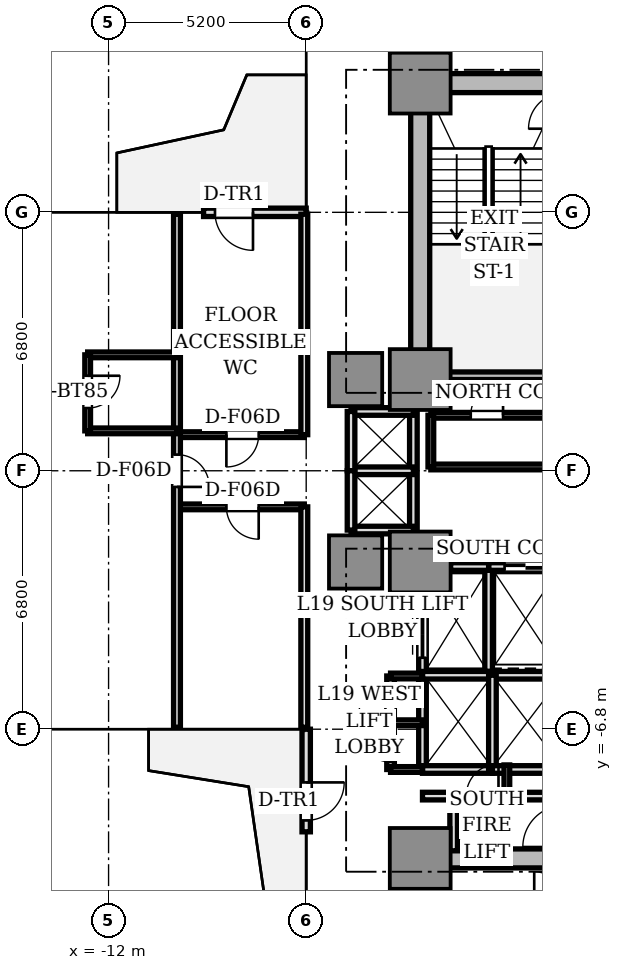
"""IFC4 building model, lengths in metres.
Left out: names, types, materials, properties, quantities, classifications, styles, units other than length and angle.
Written with IfcOpenShell. Run it as: python <this file> out.ifc"""

import sys

from ifc_helpers import new_model, si_unit, direction, frame, frame_2d, origin, origin_2d, place, context, subcontext, project, spatial, rectangle, extrude, source, transform, mapped, element, fill, save


model = new_model("IFC4")
c1 = context("Model", 3, precision=1e-05, world=origin(), true_north=direction((0.0, 1.0)))
c2 = subcontext(c1, "Body", "Model", "MODEL_VIEW")
j1 = project(units=[si_unit("LENGTHUNIT", "METRE"), si_unit("PLANEANGLEUNIT", "RADIAN")], contexts=[c1])
p1 = place(None, origin())
s1 = spatial("IfcSite", under=j1, at=p1, CompositionType="ELEMENT")
p2 = place(p1, origin())
s2 = spatial("IfcBuilding", under=s1, at=p2, CompositionType="ELEMENT")
p3 = place(p2, frame((0.0, 0.0, 71.15)))
s3 = spatial("IfcBuildingStorey", under=s2, at=p3, CompositionType="ELEMENT", Elevation=71.15)
p4 = place(p3, frame((-3.55, 10.2, 0.0), z_axis=(0.0, 0.0, 1.0), x_axis=(1.0, 0.0, 0.0)))
e1 = element("IfcWall", 1, at=p4, inside=s3, PredefinedType="SHEAR", context=c2, shape_type="SweptSolid", body=[
    extrude(rectangle(XDim=7.1, YDim=0.5, at=frame_2d((3.55, 0.0))), origin(), (0.0, 0.0, 1.0), 3.03),
])
p5 = place(p3, frame((-3.8, 2.85, 0.0), z_axis=(0.0, 0.0, 1.0), x_axis=(0.0, 1.0, 0.0)))
e2 = element("IfcWall", 2, at=p5, inside=s3, PredefinedType="SHEAR", context=c2, shape_type="SweptSolid", body=[
    extrude(rectangle(XDim=6.9, YDim=0.5, at=frame_2d((3.45, 0.0))), origin(), (0.0, 0.0, 1.0), 3.03),
])
p6 = place(p3, frame((-3.55, -10.2, 0.0), z_axis=(0.0, 0.0, 1.0), x_axis=(1.0, 0.0, 0.0)))
e3 = element("IfcWall", 3, at=p6, inside=s3, PredefinedType="SHEAR", context=c2, shape_type="SweptSolid", body=[
    extrude(rectangle(XDim=7.1, YDim=0.5, at=frame_2d((3.55, 0.0))), origin(), (0.0, 0.0, 1.0), 3.03),
])
m1 = source(origin(), c2, "Body", "SweptSolid", [
    extrude(rectangle(XDim=1.6, YDim=1.6, at=origin_2d()), origin(), (0.0, 0.0, 1.0), 3.03),
])
for number, where, z_axis, x_axis in (
    (4, (-3.8, 2.4, 0.0), (0.0, 0.0, 1.0), (1.0, 0.0, 0.0)),
    (5, (-3.8, 10.2, 0.0), (0.0, 0.0, 1.0), (1.0, 0.0, 0.0)),
    (6, (-3.8, -2.4, 0.0), (0.0, 0.0, 1.0), (1.0, 0.0, 0.0)),
    (7, (-3.8, -10.2, 0.0), (0.0, 0.0, 1.0), (1.0, 0.0, 0.0)),
):
    element("IfcColumn", number, at=place(p3, frame(where, z_axis=z_axis, x_axis=x_axis)), inside=s3, PredefinedType="COLUMN", context=c2, shape_type="MappedRepresentation", body=[
        mapped(m1, transform((0.0, 0.0, 0.0), scale=1.0)),
    ])
m2 = source(origin(), c2, "Body", "SweptSolid", [
    extrude(rectangle(XDim=1.4, YDim=1.4, at=origin_2d()), origin(), (0.0, 0.0, 1.0), 3.03),
])
for number, where, z_axis, x_axis in (
    (8, (-5.5, 2.4, 0.0), (0.0, 0.0, 1.0), (1.0, 0.0, 0.0)),
    (9, (-5.5, -2.4, 0.0), (0.0, 0.0, 1.0), (1.0, 0.0, 0.0)),
):
    element("IfcColumn", number, at=place(p3, frame(where, z_axis=z_axis, x_axis=x_axis)), inside=s3, PredefinedType="COLUMN", context=c2, shape_type="MappedRepresentation", body=[
        mapped(m2, transform((0.0, 0.0, 0.0), scale=1.0)),
    ])
p7 = place(p3, frame((-6.8, 6.8, 0.0), z_axis=(0.0, 0.0, 1.0), x_axis=(-1.0, 0.0, 0.0)))
e10 = element("IfcWall", 10, at=p7, inside=s3, PredefinedType="STANDARD", context=c2, shape_type="SweptSolid", body=[
    extrude(rectangle(XDim=2.7, YDim=0.22, at=frame_2d((1.35, 0.0))), origin(), (0.0, 0.0, 1.0), 3.03),
])
p8 = place(p7, frame((1.4, 0.0, 0.0)))
e11 = element("IfcOpeningElement", 11, at=p8, cuts=e10, PredefinedType="OPENING", context=c2, shape_type="SweptSolid", body=[
    extrude(rectangle(XDim=1.0, YDim=2.2, at=frame_2d((0.5, 1.1))), frame((0.0, 0.12, 0.0), z_axis=(0.0, -1.0, 0.0), x_axis=(1.0, 0.0, 0.0)), (0.0, 0.0, 1.0), 0.24),
])
p9 = place(p3, frame((-6.8, -6.8, 0.0), z_axis=(0.0, 0.0, 1.0), x_axis=(0.0, -1.0, 0.0)))
e12 = element("IfcWall", 12, at=p9, inside=s3, PredefinedType="STANDARD", context=c2, shape_type="SweptSolid", body=[
    extrude(rectangle(XDim=2.7, YDim=0.22, at=frame_2d((1.35, 0.0))), origin(), (0.0, 0.0, 1.0), 3.03),
])
p10 = place(p9, frame((1.4, 0.0, 0.0)))
e13 = element("IfcOpeningElement", 13, at=p10, cuts=e12, PredefinedType="OPENING", context=c2, shape_type="SweptSolid", body=[
    extrude(rectangle(XDim=1.0, YDim=2.2, at=frame_2d((0.5, 1.1))), frame((0.0, 0.12, 0.0), z_axis=(0.0, -1.0, 0.0), x_axis=(1.0, 0.0, 0.0)), (0.0, 0.0, 1.0), 0.24),
])
p11 = place(p3, frame((-3.72, 2.5, 0.0), z_axis=(0.0, 0.0, 1.0), x_axis=(1.0, 0.0, 0.0)))
e14 = element("IfcWall", 14, at=p11, inside=s3, PredefinedType="SOLIDWALL", context=c2, shape_type="SweptSolid", body=[
    extrude(rectangle(XDim=3.72, YDim=0.2, at=frame_2d((1.86, 0.0))), origin(), (0.0, 0.0, 1.0), 3.03),
])
p12 = place(p3, frame((-2.0, -5.28, 0.0), z_axis=(0.0, 0.0, 1.0), x_axis=(0.0, 1.0, 0.0)))
e15 = element("IfcWall", 15, at=p12, inside=s3, PredefinedType="SOLIDWALL", context=c2, shape_type="SweptSolid", body=[
    extrude(rectangle(XDim=2.78, YDim=0.2, at=frame_2d((1.39, 0.0))), origin(), (0.0, 0.0, 1.0), 2.58),
])
p13 = place(p3, frame((-2.0, -2.52, 0.0), z_axis=(0.0, 0.0, 1.0), x_axis=(1.0, 0.0, 0.0)))
e16 = element("IfcWall", 16, at=p13, inside=s3, PredefinedType="SOLIDWALL", context=c2, shape_type="SweptSolid", body=[
    extrude(rectangle(XDim=1.95, YDim=0.2, at=frame_2d((0.975, 0.0))), origin(), (0.0, 0.0, 1.0), 2.58),
])
p14 = place(p13, frame((0.42, 0.0, 0.0)))
e17 = element("IfcOpeningElement", 17, at=p14, cuts=e16, PredefinedType="OPENING", context=c2, shape_type="SweptSolid", body=[
    extrude(rectangle(XDim=1.1, YDim=2.2, at=frame_2d((0.55, 1.1))), frame((0.0, 0.11, 0.0), z_axis=(0.0, -1.0, 0.0), x_axis=(1.0, 0.0, 0.0)), (0.0, 0.0, 1.0), 0.22),
])
p15 = place(p3, frame((-3.0, -2.52, 0.0), z_axis=(0.0, 0.0, 1.0), x_axis=(1.0, 0.0, 0.0)))
e18 = element("IfcWall", 18, at=p15, inside=s3, PredefinedType="SOLIDWALL", context=c2, shape_type="SweptSolid", body=[
    extrude(rectangle(XDim=1.0, YDim=0.2, at=frame_2d((0.5, 0.0))), origin(), (0.0, 0.0, 1.0), 2.58),
])
p16 = place(p3, frame((-3.74, -5.36, 0.0), z_axis=(0.0, 0.0, 1.0), x_axis=(0.0, 1.0, 0.0)))
e19 = element("IfcWall", 19, at=p16, inside=s3, PredefinedType="SOLIDWALL", context=c2, shape_type="SweptSolid", body=[
    extrude(rectangle(XDim=2.08, YDim=0.2, at=frame_2d((1.04, 0.0))), origin(), (0.0, 0.0, 1.0), 2.58),
])
p17 = place(p16, frame((0.44, 0.0, 0.0)))
e20 = element("IfcOpeningElement", 20, at=p17, cuts=e19, PredefinedType="OPENING", context=c2, shape_type="SweptSolid", body=[
    extrude(rectangle(XDim=1.2, YDim=2.2, at=frame_2d((0.6, 1.1))), frame((0.0, 0.11, 0.0), z_axis=(0.0, -1.0, 0.0), x_axis=(1.0, 0.0, 0.0)), (0.0, 0.0, 1.0), 0.22),
])
p18 = place(p3, frame((-3.74, -7.86, 0.0), z_axis=(0.0, 0.0, 1.0), x_axis=(0.0, 1.0, 0.0)))
e21 = element("IfcWall", 21, at=p18, inside=s3, PredefinedType="SOLIDWALL", context=c2, shape_type="SweptSolid", body=[
    extrude(rectangle(XDim=2.48, YDim=0.2, at=frame_2d((1.24, 0.0))), origin(), (0.0, 0.0, 1.0), 2.58),
])
p19 = place(p3, frame((-3.74, -7.86, 0.0), z_axis=(0.0, 0.0, 1.0), x_axis=(1.0, 0.0, 0.0)))
e22 = element("IfcWall", 22, at=p19, inside=s3, PredefinedType="SOLIDWALL", context=c2, shape_type="SweptSolid", body=[
    extrude(rectangle(XDim=1.84, YDim=0.2, at=frame_2d((0.92, 0.0))), origin(), (0.0, 0.0, 1.0), 2.58),
])
p20 = place(p3, frame((-3.74, -5.38, 0.0), z_axis=(0.0, 0.0, 1.0), x_axis=(1.0, 0.0, 0.0)))
e23 = element("IfcWall", 23, at=p20, inside=s3, PredefinedType="SOLIDWALL", context=c2, shape_type="SweptSolid", body=[
    extrude(rectangle(XDim=3.69, YDim=0.2, at=frame_2d((1.845, 0.0))), origin(), (0.0, 0.0, 1.0), 2.58),
])
p21 = place(p3, frame((-1.9, -7.86, 0.0), z_axis=(0.0, 0.0, 1.0), x_axis=(0.0, 1.0, 0.0)))
e24 = element("IfcWall", 24, at=p21, inside=s3, PredefinedType="SOLIDWALL", context=c2, shape_type="SweptSolid", body=[
    extrude(rectangle(XDim=2.48, YDim=0.2, at=frame_2d((1.24, 0.0))), origin(), (0.0, 0.0, 1.0), 2.58),
])
p22 = place(p3, frame((-1.9, -7.86, 0.0), z_axis=(0.0, 0.0, 1.0), x_axis=(1.0, 0.0, 0.0)))
e25 = element("IfcWall", 25, at=p22, inside=s3, PredefinedType="SOLIDWALL", context=c2, shape_type="SweptSolid", body=[
    extrude(rectangle(XDim=1.85, YDim=0.2, at=frame_2d((0.925, 0.0))), origin(), (0.0, 0.0, 1.0), 2.58),
])
p23 = place(p3, frame((-3.98, -1.56, 0.0), z_axis=(0.0, 0.0, 1.0), x_axis=(0.0, 1.0, 0.0)))
e26 = element("IfcWall", 26, at=p23, inside=s3, PredefinedType="SOLIDWALL", context=c2, shape_type="SweptSolid", body=[
    extrude(rectangle(XDim=3.12, YDim=0.2, at=frame_2d((1.56, 0.0))), origin(), (0.0, 0.0, 1.0), 2.1),
])
for number, where, z_axis, x_axis in (
    (27, (-5.62, 1.56, 0.0), (0.0, 0.0, 1.0), (1.0, 0.0, 0.0)),
    (28, (-5.62, -1.56, 0.0), (0.0, 0.0, 1.0), (1.0, 0.0, 0.0)),
    (29, (-5.62, 0.0, 0.0), (0.0, 0.0, 1.0), (1.0, 0.0, 0.0)),
):
    element("IfcWall", number, at=place(p3, frame(where, z_axis=z_axis, x_axis=x_axis)), inside=s3, PredefinedType="SOLIDWALL", context=c2, shape_type="SweptSolid", body=[
        extrude(rectangle(XDim=1.64, YDim=0.2, at=frame_2d((0.82, 0.0))), origin(), (0.0, 0.0, 1.0), 2.58),
    ])
for number, where, z_axis, x_axis in (
    (30, (-5.62, 0.0, 0.0), (0.0, 0.0, 1.0), (0.0, 1.0, 0.0)),
    (31, (-5.62, -1.56, 0.0), (0.0, 0.0, 1.0), (0.0, 1.0, 0.0)),
):
    element("IfcWall", number, at=place(p3, frame(where, z_axis=z_axis, x_axis=x_axis)), inside=s3, PredefinedType="SOLIDWALL", context=c2, shape_type="SweptSolid", body=[
        extrude(rectangle(XDim=1.56, YDim=0.2, at=frame_2d((0.78, 0.0))), origin(), (0.0, 0.0, 1.0), 2.58),
    ])
p24 = place(p3, frame((-3.74, -8.56, 0.0), z_axis=(0.0, 0.0, 1.0), x_axis=(1.0, 0.0, 0.0)))
e32 = element("IfcWall", 32, at=p24, inside=s3, PredefinedType="SOLIDWALL", context=c2, shape_type="SweptSolid", body=[
    extrude(rectangle(XDim=3.62, YDim=0.2, at=frame_2d((1.81, 0.0))), origin(), (0.0, 0.0, 1.0), 2.58),
])
p25 = place(p24, frame((1.15, 0.0, 0.0)))
e33 = element("IfcOpeningElement", 33, at=p25, cuts=e32, PredefinedType="OPENING", context=c2, shape_type="SweptSolid", body=[
    extrude(rectangle(XDim=0.85, YDim=2.1, at=frame_2d((0.425, 1.05))), frame((0.0, 0.11, 0.0), z_axis=(0.0, -1.0, 0.0), x_axis=(1.0, 0.0, 0.0)), (0.0, 0.0, 1.0), 0.22),
])
p26 = place(p3, frame((-2.92, -10.0, 0.0), z_axis=(0.0, 0.0, 1.0), x_axis=(0.0, 1.0, 0.0)))
e34 = element("IfcWall", 34, at=p26, inside=s3, PredefinedType="SOLIDWALL", context=c2, shape_type="SweptSolid", body=[
    extrude(rectangle(XDim=1.44, YDim=0.2, at=frame_2d((0.72, 0.0))), origin(), (0.0, 0.0, 1.0), 2.58),
])
p27 = place(p3, frame((-1.52, -8.56, 0.0), z_axis=(0.0, 0.0, 1.0), x_axis=(0.0, 1.0, 0.0)))
e35 = element("IfcWall", 35, at=p27, inside=s3, PredefinedType="PARTITIONING", context=c2, shape_type="SweptSolid", body=[
    extrude(rectangle(XDim=0.82, YDim=0.15, at=frame_2d((0.41, 0.0))), origin(), (0.0, 0.0, 1.0), 2.58),
])
p28 = place(p3, frame((-4.58, -7.86, 0.0), z_axis=(0.0, 0.0, 1.0), x_axis=(0.0, 1.0, 0.0)))
e36 = element("IfcWall", 36, at=p28, inside=s3, PredefinedType="SOLIDWALL", context=c2, shape_type="SweptSolid", body=[
    extrude(rectangle(XDim=2.46, YDim=0.2, at=frame_2d((1.23, 0.0))), origin(), (0.0, 0.0, 1.0), 2.58),
])
p29 = place(p28, frame((0.2, 0.0, 0.0)))
e37 = element("IfcOpeningElement", 37, at=p29, cuts=e36, PredefinedType="OPENING", context=c2, shape_type="SweptSolid", body=[
    extrude(rectangle(XDim=0.85, YDim=2.1, at=frame_2d((0.425, 1.05))), frame((0.0, 0.11, 0.0), z_axis=(0.0, -1.0, 0.0), x_axis=(1.0, 0.0, 0.0)), (0.0, 0.0, 1.0), 0.22),
])
p30 = place(p28, frame((1.38, 0.0, 0.0)))
e38 = element("IfcOpeningElement", 38, at=p30, cuts=e36, PredefinedType="OPENING", context=c2, shape_type="SweptSolid", body=[
    extrude(rectangle(XDim=0.85, YDim=2.1, at=frame_2d((0.425, 1.05))), frame((0.0, 0.11, 0.0), z_axis=(0.0, -1.0, 0.0), x_axis=(1.0, 0.0, 0.0)), (0.0, 0.0, 1.0), 0.22),
])
for number, where, z_axis, x_axis in (
    (39, (-4.58, -5.4, 0.0), (0.0, 0.0, 1.0), (1.0, 0.0, 0.0)),
    (40, (-4.58, -7.86, 0.0), (0.0, 0.0, 1.0), (1.0, 0.0, 0.0)),
    (41, (-4.58, -6.63, 0.0), (0.0, 0.0, 1.0), (1.0, 0.0, 0.0)),
):
    element("IfcWall", number, at=place(p3, frame(where, z_axis=z_axis, x_axis=x_axis)), inside=s3, PredefinedType="PARTITIONING", context=c2, shape_type="SweptSolid", body=[
        extrude(rectangle(XDim=0.84, YDim=0.15, at=frame_2d((0.42, 0.0))), origin(), (0.0, 0.0, 1.0), 2.58),
    ])
p31 = place(p3, frame((-3.52, 0.1, 0.0), z_axis=(0.0, 0.0, 1.0), x_axis=(1.0, 0.0, 0.0)))
e42 = element("IfcWall", 42, at=p31, inside=s3, PredefinedType="PARTITIONING", context=c2, shape_type="SweptSolid", body=[
    extrude(rectangle(XDim=3.14, YDim=0.15, at=frame_2d((1.57, 0.0))), origin(), (0.0, 0.0, 1.0), 2.58),
])
p32 = place(p3, frame((-3.52, 1.46, 0.0), z_axis=(0.0, 0.0, 1.0), x_axis=(1.0, 0.0, 0.0)))
e43 = element("IfcWall", 43, at=p32, inside=s3, PredefinedType="PARTITIONING", context=c2, shape_type="SweptSolid", body=[
    extrude(rectangle(XDim=3.14, YDim=0.15, at=frame_2d((1.57, 0.0))), origin(), (0.0, 0.0, 1.0), 2.58),
])
p33 = place(p32, frame((1.05, 0.0, 0.0)))
e44 = element("IfcOpeningElement", 44, at=p33, cuts=e43, PredefinedType="OPENING", context=c2, shape_type="SweptSolid", body=[
    extrude(rectangle(XDim=0.85, YDim=2.1, at=frame_2d((0.425, 1.05))), frame((0.0, 0.085, 0.0), z_axis=(0.0, -1.0, 0.0), x_axis=(1.0, 0.0, 0.0)), (0.0, 0.0, 1.0), 0.17),
])
p34 = place(p3, frame((-3.52, 0.1, 0.0), z_axis=(0.0, 0.0, 1.0), x_axis=(0.0, 1.0, 0.0)))
e45 = element("IfcWall", 45, at=p34, inside=s3, PredefinedType="PARTITIONING", context=c2, shape_type="SweptSolid", body=[
    extrude(rectangle(XDim=1.36, YDim=0.15, at=frame_2d((0.68, 0.0))), origin(), (0.0, 0.0, 1.0), 2.1),
])
p35 = place(p3, frame((-6.85, -0.95, 0.0), z_axis=(0.0, 0.0, 1.0), x_axis=(-1.0, 0.0, 0.0)))
e46 = element("IfcWall", 46, at=p35, inside=s3, PredefinedType="PARTITIONING", context=c2, shape_type="SweptSolid", body=[
    extrude(rectangle(XDim=3.35, YDim=0.15, at=frame_2d((1.675, 0.0))), origin(), (0.0, 0.0, 1.0), 2.58),
])
p36 = place(p35, frame((1.2, 0.0, 0.0)))
e47 = element("IfcOpeningElement", 47, at=p36, cuts=e46, PredefinedType="OPENING", context=c2, shape_type="SweptSolid", body=[
    extrude(rectangle(XDim=0.85, YDim=2.1, at=frame_2d((0.425, 1.05))), frame((0.0, 0.085, 0.0), z_axis=(0.0, -1.0, 0.0), x_axis=(1.0, 0.0, 0.0)), (0.0, 0.0, 1.0), 0.17),
])
p37 = place(p3, frame((-6.85, 0.95, 0.0), z_axis=(0.0, 0.0, 1.0), x_axis=(-1.0, 0.0, 0.0)))
e48 = element("IfcWall", 48, at=p37, inside=s3, PredefinedType="PARTITIONING", context=c2, shape_type="SweptSolid", body=[
    extrude(rectangle(XDim=3.35, YDim=0.15, at=frame_2d((1.675, 0.0))), origin(), (0.0, 0.0, 1.0), 2.58),
])
p38 = place(p37, frame((1.2, 0.0, 0.0)))
e49 = element("IfcOpeningElement", 49, at=p38, cuts=e48, PredefinedType="OPENING", context=c2, shape_type="SweptSolid", body=[
    extrude(rectangle(XDim=0.85, YDim=2.1, at=frame_2d((0.425, 1.05))), frame((0.0, 0.085, 0.0), z_axis=(0.0, -1.0, 0.0), x_axis=(1.0, 0.0, 0.0)), (0.0, 0.0, 1.0), 0.17),
])
for number, where, z_axis, x_axis in (
    (50, (-6.85, -0.95, 0.0), (0.0, 0.0, 1.0), (0.0, -1.0, 0.0)),
    (51, (-6.85, 6.75, 0.0), (0.0, 0.0, 1.0), (0.0, -1.0, 0.0)),
):
    element("IfcWall", number, at=place(p3, frame(where, z_axis=z_axis, x_axis=x_axis)), inside=s3, PredefinedType="PARTITIONING", context=c2, shape_type="SweptSolid", body=[
        extrude(rectangle(XDim=5.8, YDim=0.18, at=frame_2d((2.9, 0.0))), origin(), (0.0, 0.0, 1.0), 2.58),
    ])
p39 = place(p3, frame((-10.2, 6.75, 0.0), z_axis=(0.0, 0.0, 1.0), x_axis=(0.0, -1.0, 0.0)))
e52 = element("IfcWall", 52, at=p39, inside=s3, PredefinedType="PARTITIONING", context=c2, shape_type="SweptSolid", body=[
    extrude(rectangle(XDim=13.5, YDim=0.18, at=frame_2d((6.75, 0.0))), origin(), (0.0, 0.0, 1.0), 2.58),
])
p40 = place(p39, frame((6.325, 0.0, 0.0)))
e53 = element("IfcOpeningElement", 53, at=p40, cuts=e52, PredefinedType="OPENING", context=c2, shape_type="SweptSolid", body=[
    extrude(rectangle(XDim=0.85, YDim=2.1, at=frame_2d((0.425, 1.05))), frame((0.0, 0.1, 0.0), z_axis=(0.0, -1.0, 0.0), x_axis=(1.0, 0.0, 0.0)), (0.0, 0.0, 1.0), 0.2),
])
p41 = place(p3, frame((-10.2, 1.05, 0.0), z_axis=(0.0, 0.0, 1.0), x_axis=(-1.0, 0.0, 0.0)))
e54 = element("IfcWall", 54, at=p41, inside=s3, PredefinedType="PARTITIONING", context=c2, shape_type="SweptSolid", body=[
    extrude(rectangle(XDim=2.35, YDim=0.15, at=frame_2d((1.175, 0.0))), origin(), (0.0, 0.0, 1.0), 2.58),
])
p42 = place(p3, frame((-10.2, 3.05, 0.0), z_axis=(0.0, 0.0, 1.0), x_axis=(-1.0, 0.0, 0.0)))
e55 = element("IfcWall", 55, at=p42, inside=s3, PredefinedType="PARTITIONING", context=c2, shape_type="SweptSolid", body=[
    extrude(rectangle(XDim=2.35, YDim=0.15, at=frame_2d((1.175, 0.0))), origin(), (0.0, 0.0, 1.0), 2.55),
])
p43 = place(p3, frame((-12.55, 3.05, 0.0), z_axis=(0.0, 0.0, 1.0), x_axis=(0.0, -1.0, 0.0)))
e56 = element("IfcWall", 56, at=p43, inside=s3, PredefinedType="PARTITIONING", context=c2, shape_type="SweptSolid", body=[
    extrude(rectangle(XDim=2.0, YDim=0.15, at=frame_2d((1.0, 0.0))), origin(), (0.0, 0.0, 1.0), 2.58),
])
p44 = place(p43, frame((0.55, 0.0, 0.0)))
e57 = element("IfcOpeningElement", 57, at=p44, cuts=e56, PredefinedType="OPENING", context=c2, shape_type="SweptSolid", body=[
    extrude(rectangle(XDim=0.85, YDim=2.1, at=frame_2d((0.425, 1.05))), frame((0.0, 0.085, 0.0), z_axis=(0.0, -1.0, 0.0), x_axis=(1.0, 0.0, 0.0)), (0.0, 0.0, 1.0), 0.17),
])
m3 = source(origin(), c2, "Body", "SweptSolid", [
    extrude(rectangle(XDim=1.0, YDim=0.05, at=origin_2d()), origin(), (0.0, 0.0, 1.0), 2.2),
])
p45 = place(p8, frame((0.5, 0.0, 0.0)))
e58 = element("IfcDoor", 58, at=p45, inside=s3, OperationType="SINGLE_SWING_LEFT", PredefinedType="DOOR", context=c2, shape_type="MappedRepresentation", body=[
    mapped(m3, transform((0.0, 0.0, 0.0), scale=1.0)),
])
fill(e11, e58)
p46 = place(p10, frame((0.5, 0.0, 0.0)))
e59 = element("IfcDoor", 59, at=p46, inside=s3, OperationType="SINGLE_SWING_LEFT", PredefinedType="DOOR", context=c2, shape_type="MappedRepresentation", body=[
    mapped(m3, transform((0.0, 0.0, 0.0), scale=1.0)),
])
fill(e13, e59)
m4 = source(origin(), c2, "Body", "SweptSolid", [
    extrude(rectangle(XDim=1.1, YDim=0.05, at=origin_2d()), origin(), (0.0, 0.0, 1.0), 2.2),
])
p47 = place(p14, frame((0.55, 0.0, 0.0)))
e60 = element("IfcDoor", 60, at=p47, inside=s3, OperationType="DOUBLE_DOOR_SLIDING", PredefinedType="DOOR", context=c2, shape_type="MappedRepresentation", body=[
    mapped(m4, transform((0.0, 0.0, 0.0), scale=1.0)),
])
fill(e17, e60)
m5 = source(origin(), c2, "Body", "SweptSolid", [
    extrude(rectangle(XDim=1.2, YDim=0.05, at=origin_2d()), origin(), (0.0, 0.0, 1.0), 2.2),
])
p48 = place(p17, frame((0.6, 0.0, 0.0)))
e61 = element("IfcDoor", 61, at=p48, inside=s3, OperationType="DOUBLE_DOOR_SLIDING", PredefinedType="DOOR", context=c2, shape_type="MappedRepresentation", body=[
    mapped(m5, transform((0.0, 0.0, 0.0), scale=1.0)),
])
fill(e20, e61)
m6 = source(origin(), c2, "Body", "SweptSolid", [
    extrude(rectangle(XDim=0.85, YDim=0.05, at=origin_2d()), origin(), (0.0, 0.0, 1.0), 2.1),
])
p49 = place(p25, frame((0.425, 0.0, 0.0)))
e62 = element("IfcDoor", 62, at=p49, inside=s3, OperationType="SINGLE_SWING_RIGHT", PredefinedType="DOOR", context=c2, shape_type="MappedRepresentation", body=[
    mapped(m6, transform((0.0, 0.0, 0.0), scale=1.0)),
])
fill(e33, e62)
p50 = place(p29, frame((0.425, 0.0, 0.0)))
e63 = element("IfcDoor", 63, at=p50, inside=s3, OperationType="SINGLE_SWING_RIGHT", PredefinedType="DOOR", context=c2, shape_type="MappedRepresentation", body=[
    mapped(m6, transform((0.0, 0.0, 0.0), scale=1.0)),
])
fill(e37, e63)
p51 = place(p30, frame((0.425, 0.0, 0.0)))
e64 = element("IfcDoor", 64, at=p51, inside=s3, OperationType="SINGLE_SWING_LEFT", PredefinedType="DOOR", context=c2, shape_type="MappedRepresentation", body=[
    mapped(m6, transform((0.0, 0.0, 0.0), scale=1.0)),
])
fill(e38, e64)
p52 = place(p33, frame((0.425, 0.0, 0.0)))
e65 = element("IfcDoor", 65, at=p52, inside=s3, OperationType="SINGLE_SWING_RIGHT", PredefinedType="DOOR", context=c2, shape_type="MappedRepresentation", body=[
    mapped(m6, transform((0.0, 0.0, 0.0), scale=1.0)),
])
fill(e44, e65)
p53 = place(p36, frame((0.425, 0.0, 0.0)))
e66 = element("IfcDoor", 66, at=p53, inside=s3, OperationType="SINGLE_SWING_LEFT", PredefinedType="DOOR", context=c2, shape_type="MappedRepresentation", body=[
    mapped(m6, transform((0.0, 0.0, 0.0), scale=1.0)),
])
fill(e47, e66)
p54 = place(p38, frame((0.425, 0.0, 0.0)))
e67 = element("IfcDoor", 67, at=p54, inside=s3, OperationType="SINGLE_SWING_RIGHT", PredefinedType="DOOR", context=c2, shape_type="MappedRepresentation", body=[
    mapped(m6, transform((0.0, 0.0, 0.0), scale=1.0)),
])
fill(e49, e67)
p55 = place(p44, frame((0.425, 0.0, 0.0)))
e68 = element("IfcDoor", 68, at=p55, inside=s3, OperationType="SINGLE_SWING_LEFT", PredefinedType="DOOR", context=c2, shape_type="MappedRepresentation", body=[
    mapped(m6, transform((0.0, 0.0, 0.0), scale=1.0)),
])
fill(e57, e68)
p56 = place(p40, frame((0.425, 0.0, 0.0)))
e69 = element("IfcDoor", 69, at=p56, inside=s3, OperationType="SINGLE_SWING_RIGHT", PredefinedType="DOOR", context=c2, shape_type="MappedRepresentation", body=[
    mapped(m6, transform((0.0, 0.0, 0.0), scale=1.0)),
])
fill(e53, e69)
save(model, sys.argv[1])
